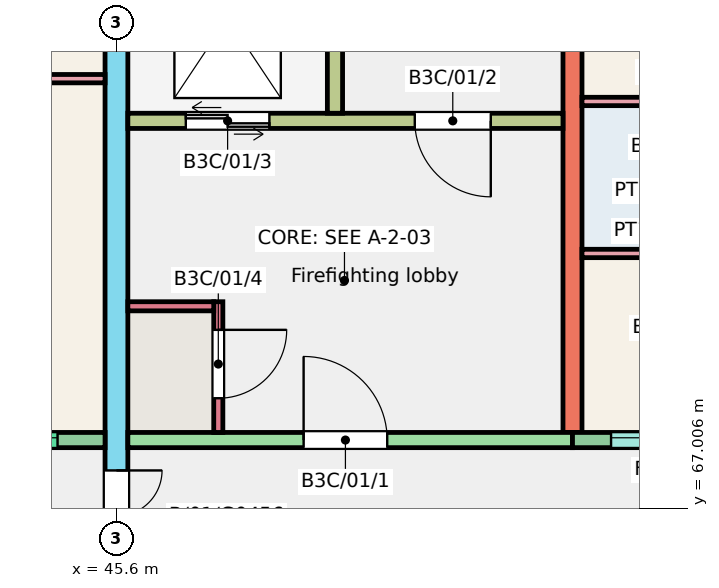
"""IFC4 building model, lengths in metres.
Left out: names, types, materials, properties, quantities, classifications, styles, units other than length and angle.
Written with IfcOpenShell. Run it as: python <this file> out.ifc"""

import sys

from ifc_helpers import new_model, si_unit, direction, frame, frame_2d, origin, place, context, subcontext, project, spatial, rectangle, extrude, element, fill, save


model = new_model("IFC4")
c1 = context("Model", 3, precision=1e-05, world=origin(), true_north=direction((0.0, 1.0)))
c2 = subcontext(c1, "Body", "Model", "MODEL_VIEW")
j1 = project(units=[si_unit("LENGTHUNIT", "METRE"), si_unit("PLANEANGLEUNIT", "RADIAN")], contexts=[c1])
p1 = place(None, origin())
s1 = spatial("IfcSite", under=j1, at=p1, CompositionType="ELEMENT")
p2 = place(p1, origin())
s2 = spatial("IfcBuilding", under=s1, at=p2, CompositionType="ELEMENT")
p3 = place(p2, frame((0.0, 0.0, 3.0)))
s3 = spatial("IfcBuildingStorey", under=s2, at=p3, CompositionType="ELEMENT", Elevation=3.0)
p4 = place(p3, frame((45.6, 66.0, 0.0), z_axis=(0.0, 0.0, 1.0), x_axis=(0.0, 1.0, 0.0)))
e1 = element("IfcWall", 1, at=p4, inside=s3, PredefinedType="SHEAR", context=c2, shape_type="SweptSolid", body=[
    extrude(rectangle(XDim=11.0, YDim=0.3, at=frame_2d((5.5, 0.0))), origin(), (0.0, 0.0, 1.0), 3.0),
])
p5 = place(p4, frame((0.3, 0.0, 0.0)))
e2 = element("IfcOpeningElement", 2, at=p5, cuts=e1, PredefinedType="OPENING", context=c2, shape_type="SweptSolid", body=[
    extrude(rectangle(XDim=1.2, YDim=2.1, at=frame_2d((0.6, 1.05))), frame((0.0, 0.16, 0.0), z_axis=(0.0, -1.0, 0.0), x_axis=(1.0, 0.0, 0.0)), (0.0, 0.0, 1.0), 0.32),
])
p6 = place(p3, frame((51.6, 68.0, 0.0), z_axis=(0.0, 0.0, 1.0), x_axis=(0.0, 1.0, 0.0)))
e3 = element("IfcWall", 3, at=p6, inside=s3, PredefinedType="SHEAR", context=c2, shape_type="SweptSolid", body=[
    extrude(rectangle(XDim=9.0, YDim=0.25, at=frame_2d((4.5, 0.0))), origin(), (0.0, 0.0, 1.0), 3.0),
])
p7 = place(p3, frame((42.0, 67.9, 0.0), z_axis=(0.0, 0.0, 1.0), x_axis=(1.0, 0.0, 0.0)))
e4 = element("IfcWall", 4, at=p7, inside=s3, PredefinedType="SOLIDWALL", context=c2, shape_type="SweptSolid", body=[
    extrude(rectangle(XDim=3.45, YDim=0.2, at=frame_2d((1.725, 0.0))), origin(), (0.0, 0.0, 1.0), 3.0),
])
p8 = place(p7, frame((0.725, 0.0, 1.2)))
e5 = element("IfcOpeningElement", 5, at=p8, cuts=e4, PredefinedType="OPENING", context=c2, shape_type="SweptSolid", body=[
    extrude(rectangle(XDim=2.1, YDim=1.2, at=frame_2d((1.05, 0.6))), frame((0.0, 0.11, 0.0), z_axis=(0.0, -1.0, 0.0), x_axis=(1.0, 0.0, 0.0)), (0.0, 0.0, 1.0), 0.22),
])
p9 = place(p3, frame((45.75, 67.9, 0.0), z_axis=(0.0, 0.0, 1.0), x_axis=(1.0, 0.0, 0.0)))
e6 = element("IfcWall", 6, at=p9, inside=s3, PredefinedType="SHEAR", context=c2, shape_type="SweptSolid", body=[
    extrude(rectangle(XDim=5.85, YDim=0.2, at=frame_2d((2.925, 0.0))), origin(), (0.0, 0.0, 1.0), 3.0),
])
p10 = place(p9, frame((2.312, 0.0, 0.0)))
e7 = element("IfcOpeningElement", 7, at=p10, cuts=e6, PredefinedType="OPENING", context=c2, shape_type="SweptSolid", body=[
    extrude(rectangle(XDim=1.1, YDim=2.1, at=frame_2d((0.55, 1.05))), frame((0.0, 0.11, 0.0), z_axis=(0.0, -1.0, 0.0), x_axis=(1.0, 0.0, 0.0)), (0.0, 0.0, 1.0), 0.22),
])
p11 = place(p3, frame((45.75, 72.1, 0.0), z_axis=(0.0, 0.0, 1.0), x_axis=(1.0, 0.0, 0.0)))
e8 = element("IfcWall", 8, at=p11, inside=s3, PredefinedType="SHEAR", context=c2, shape_type="SweptSolid", body=[
    extrude(rectangle(XDim=5.725, YDim=0.2, at=frame_2d((2.863, 0.0))), origin(), (0.0, 0.0, 1.0), 3.0),
])
p12 = place(p11, frame((3.775, 0.0, 0.0)))
e9 = element("IfcOpeningElement", 9, at=p12, cuts=e8, PredefinedType="OPENING", context=c2, shape_type="SweptSolid", body=[
    extrude(rectangle(XDim=1.0, YDim=2.1, at=frame_2d((0.5, 1.05))), frame((0.0, 0.11, 0.0), z_axis=(0.0, -1.0, 0.0), x_axis=(1.0, 0.0, 0.0)), (0.0, 0.0, 1.0), 0.22),
])
p13 = place(p11, frame((0.762, 0.0, 0.0)))
e10 = element("IfcOpeningElement", 10, at=p13, cuts=e8, PredefinedType="OPENING", context=c2, shape_type="SweptSolid", body=[
    extrude(rectangle(XDim=1.1, YDim=2.1, at=frame_2d((0.55, 1.05))), frame((0.0, 0.11, 0.0), z_axis=(0.0, -1.0, 0.0), x_axis=(1.0, 0.0, 0.0)), (0.0, 0.0, 1.0), 0.22),
])
p14 = place(p3, frame((48.475, 72.2, 0.0), z_axis=(0.0, 0.0, 1.0), x_axis=(0.0, 1.0, 0.0)))
e11 = element("IfcWall", 11, at=p14, inside=s3, PredefinedType="SHEAR", context=c2, shape_type="SweptSolid", body=[
    extrude(rectangle(XDim=4.8, YDim=0.2, at=frame_2d((2.4, 0.0))), origin(), (0.0, 0.0, 1.0), 3.0),
])
p15 = place(p3, frame((46.94, 68.0, 0.0), z_axis=(0.0, 0.0, 1.0), x_axis=(0.0, 1.0, 0.0)))
e12 = element("IfcWall", 12, at=p15, inside=s3, PredefinedType="SHEAR", context=c2, shape_type="SweptSolid", body=[
    extrude(rectangle(XDim=1.72, YDim=0.12, at=frame_2d((0.86, 0.0))), origin(), (0.0, 0.0, 1.0), 3.0),
])
p16 = place(p15, frame((0.45, 0.0, 0.0)))
e13 = element("IfcOpeningElement", 13, at=p16, cuts=e12, PredefinedType="OPENING", context=c2, shape_type="SweptSolid", body=[
    extrude(rectangle(XDim=0.9, YDim=2.1, at=frame_2d((0.45, 1.05))), frame((0.0, 0.07, 0.0), z_axis=(0.0, -1.0, 0.0), x_axis=(1.0, 0.0, 0.0)), (0.0, 0.0, 1.0), 0.14),
])
p17 = place(p3, frame((45.75, 69.66, 0.0), z_axis=(0.0, 0.0, 1.0), x_axis=(1.0, 0.0, 0.0)))
e14 = element("IfcWall", 14, at=p17, inside=s3, PredefinedType="SHEAR", context=c2, shape_type="SweptSolid", body=[
    extrude(rectangle(XDim=1.13, YDim=0.12, at=frame_2d((0.565, 0.0))), origin(), (0.0, 0.0, 1.0), 3.0),
])
p18 = place(p3, frame((51.6, 67.9, 0.0), z_axis=(0.0, 0.0, 1.0), x_axis=(1.0, 0.0, 0.0)))
e15 = element("IfcWall", 15, at=p18, inside=s3, PredefinedType="SOLIDWALL", context=c2, shape_type="SweptSolid", body=[
    extrude(rectangle(XDim=3.6, YDim=0.2, at=frame_2d((1.8, 0.0))), origin(), (0.0, 0.0, 1.0), 3.0),
])
p19 = place(p18, frame((0.508, 0.0, 1.1)))
e16 = element("IfcOpeningElement", 16, at=p19, cuts=e15, PredefinedType="OPENING", context=c2, shape_type="SweptSolid", body=[
    extrude(rectangle(XDim=1.2, YDim=1.3, at=frame_2d((0.6, 0.65))), frame((0.0, 0.11, 0.0), z_axis=(0.0, -1.0, 0.0), x_axis=(1.0, 0.0, 0.0)), (0.0, 0.0, 1.0), 0.22),
])
p20 = place(p18, frame((2.35, 0.0, 0.0)))
e17 = element("IfcOpeningElement", 17, at=p20, cuts=e15, PredefinedType="OPENING", context=c2, shape_type="SweptSolid", body=[
    extrude(rectangle(XDim=1.0, YDim=2.1, at=frame_2d((0.5, 1.05))), frame((0.0, 0.11, 0.0), z_axis=(0.0, -1.0, 0.0), x_axis=(1.0, 0.0, 0.0)), (0.0, 0.0, 1.0), 0.22),
])
p21 = place(p3, frame((42.1, 72.655, 0.0), z_axis=(0.0, 0.0, 1.0), x_axis=(1.0, 0.0, 0.0)))
e18 = element("IfcWall", 18, at=p21, inside=s3, PredefinedType="PARTITIONING", context=c2, shape_type="SweptSolid", body=[
    extrude(rectangle(XDim=3.35, YDim=0.11, at=frame_2d((1.675, 0.0))), origin(), (0.0, 0.0, 1.0), 2.8),
])
p22 = place(p3, frame((51.725, 70.355, 0.0), z_axis=(0.0, 0.0, 1.0), x_axis=(1.0, 0.0, 0.0)))
e19 = element("IfcWall", 19, at=p22, inside=s3, PredefinedType="PARTITIONING", context=c2, shape_type="SweptSolid", body=[
    extrude(rectangle(XDim=1.965, YDim=0.11, at=frame_2d((0.982, 0.0))), origin(), (0.0, 0.0, 1.0), 2.8),
])
p23 = place(p3, frame((51.725, 72.355, 0.0), z_axis=(0.0, 0.0, 1.0), x_axis=(1.0, 0.0, 0.0)))
e20 = element("IfcWall", 20, at=p23, inside=s3, PredefinedType="PARTITIONING", context=c2, shape_type="SweptSolid", body=[
    extrude(rectangle(XDim=3.375, YDim=0.11, at=frame_2d((1.688, 0.0))), origin(), (0.0, 0.0, 1.0), 2.8),
])
p24 = place(p23, frame((2.275, 0.0, 0.0)))
e21 = element("IfcOpeningElement", 21, at=p24, cuts=e20, PredefinedType="OPENING", context=c2, shape_type="SweptSolid", body=[
    extrude(rectangle(XDim=0.9, YDim=2.1, at=frame_2d((0.45, 1.05))), frame((0.0, 0.065, 0.0), z_axis=(0.0, -1.0, 0.0), x_axis=(1.0, 0.0, 0.0)), (0.0, 0.0, 1.0), 0.13),
])
p25 = place(p8, origin())
e22 = element("IfcWindow", 22, at=p25, inside=s3, PartitioningType="SINGLE_PANEL", PredefinedType="WINDOW", context=c2, shape_type="SweptSolid", body=[
    extrude(rectangle(XDim=2.1, YDim=1.2, at=frame_2d((1.05, 0.6))), frame((0.0, 0.06, 0.0), z_axis=(0.0, -1.0, 0.0), x_axis=(1.0, 0.0, 0.0)), (0.0, 0.0, 1.0), 0.06),
])
fill(e5, e22)
p26 = place(p19, origin())
e23 = element("IfcWindow", 23, at=p26, inside=s3, PartitioningType="SINGLE_PANEL", PredefinedType="WINDOW", context=c2, shape_type="SweptSolid", body=[
    extrude(rectangle(XDim=1.2, YDim=1.3, at=frame_2d((0.6, 0.65))), frame((0.0, 0.06, 0.0), z_axis=(0.0, -1.0, 0.0), x_axis=(1.0, 0.0, 0.0)), (0.0, 0.0, 1.0), 0.06),
])
fill(e16, e23)
p27 = place(p10, origin())
e24 = element("IfcDoor", 24, at=p27, inside=s3, OperationType="SINGLE_SWING_LEFT", PredefinedType="DOOR", context=c2, shape_type="SweptSolid", body=[
    extrude(rectangle(XDim=1.1, YDim=2.1, at=frame_2d((0.55, 1.05))), frame((0.0, 0.025, 0.0), z_axis=(0.0, -1.0, 0.0), x_axis=(1.0, 0.0, 0.0)), (0.0, 0.0, 1.0), 0.05),
])
fill(e7, e24)
p28 = place(p12, origin())
e25 = element("IfcDoor", 25, at=p28, inside=s3, OperationType="SINGLE_SWING_RIGHT", PredefinedType="DOOR", context=c2, shape_type="SweptSolid", body=[
    extrude(rectangle(XDim=1.0, YDim=2.1, at=frame_2d((0.5, 1.05))), frame((0.0, 0.025, 0.0), z_axis=(0.0, -1.0, 0.0), x_axis=(1.0, 0.0, 0.0)), (0.0, 0.0, 1.0), 0.05),
])
fill(e9, e25)
p29 = place(p13, origin())
e26 = element("IfcDoor", 26, at=p29, inside=s3, OperationType="DOUBLE_DOOR_SLIDING", PredefinedType="DOOR", context=c2, shape_type="SweptSolid", body=[
    extrude(rectangle(XDim=1.1, YDim=2.1, at=frame_2d((0.55, 1.05))), frame((0.0, 0.025, 0.0), z_axis=(0.0, -1.0, 0.0), x_axis=(1.0, 0.0, 0.0)), (0.0, 0.0, 1.0), 0.05),
])
fill(e10, e26)
p30 = place(p16, origin())
e27 = element("IfcDoor", 27, at=p30, inside=s3, OperationType="SINGLE_SWING_RIGHT", PredefinedType="DOOR", context=c2, shape_type="SweptSolid", body=[
    extrude(rectangle(XDim=0.9, YDim=2.1, at=frame_2d((0.45, 1.05))), frame((0.0, 0.025, 0.0), z_axis=(0.0, -1.0, 0.0), x_axis=(1.0, 0.0, 0.0)), (0.0, 0.0, 1.0), 0.05),
])
fill(e13, e27)
p31 = place(p5, origin())
e28 = element("IfcDoor", 28, at=p31, inside=s3, OperationType="DOUBLE_DOOR_SINGLE_SWING", PredefinedType="DOOR", context=c2, shape_type="SweptSolid", body=[
    extrude(rectangle(XDim=1.2, YDim=2.1, at=frame_2d((0.6, 1.05))), frame((0.0, 0.025, 0.0), z_axis=(0.0, -1.0, 0.0), x_axis=(1.0, 0.0, 0.0)), (0.0, 0.0, 1.0), 0.05),
])
fill(e2, e28)
save(model, sys.argv[1])
